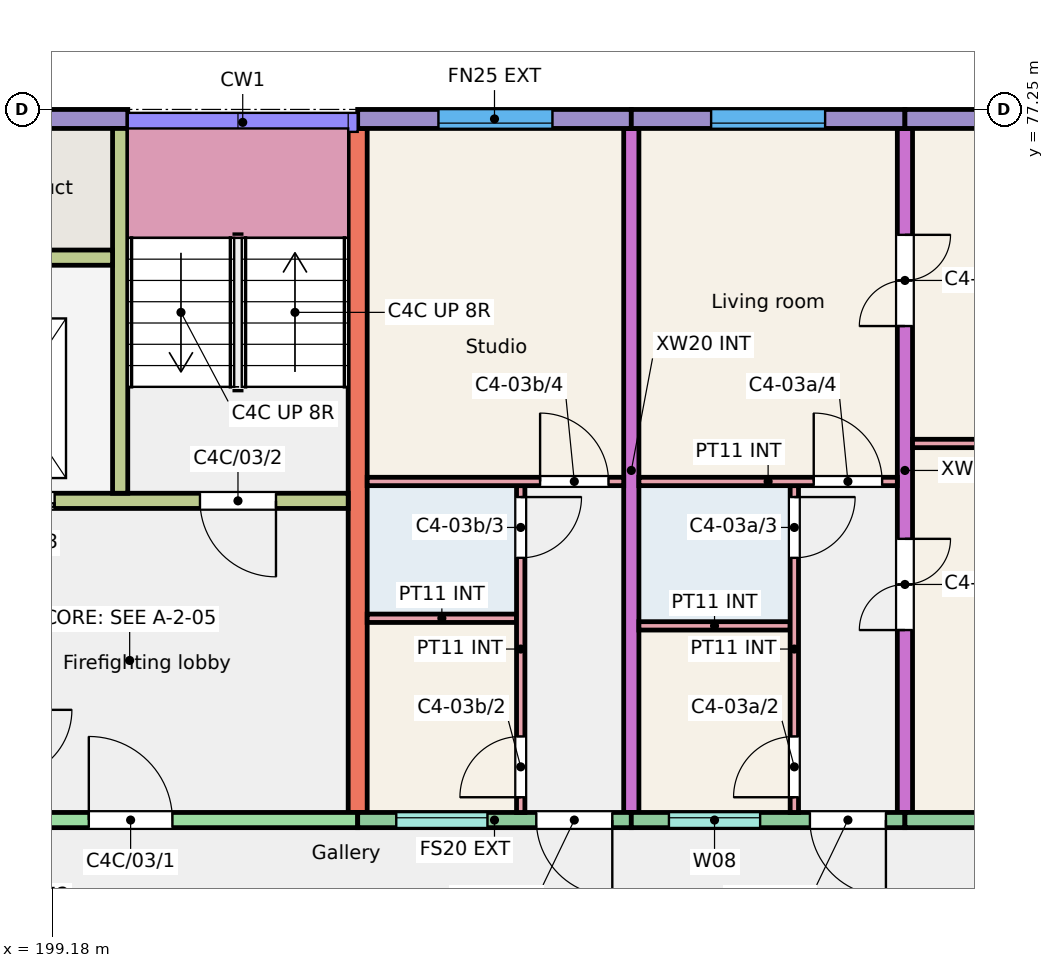
"""IFC4 building model, lengths in metres.
Left out: names, types, materials, properties, quantities, classifications, styles, units other than length and angle.
Written with IfcOpenShell. Run it as: python <this file> out.ifc"""

import sys

from ifc_helpers import new_model, si_unit, direction, frame, frame_2d, origin, place, context, subcontext, project, spatial, rectangle, extrude, element, fill, save


model = new_model("IFC4")
c1 = context("Model", 3, precision=1e-05, world=origin(), true_north=direction((0.0, 1.0)))
c2 = subcontext(c1, "Body", "Model", "MODEL_VIEW")
j1 = project(units=[si_unit("LENGTHUNIT", "METRE"), si_unit("PLANEANGLEUNIT", "RADIAN")], contexts=[c1])
p1 = place(None, origin())
s1 = spatial("IfcSite", under=j1, at=p1, CompositionType="ELEMENT")
p2 = place(p1, origin())
s2 = spatial("IfcBuilding", under=s1, at=p2, CompositionType="ELEMENT")
p3 = place(p2, frame((0.0, 0.0, 9.0)))
s3 = spatial("IfcBuildingStorey", under=s2, at=p3, CompositionType="ELEMENT", Elevation=9.0)
p4 = place(p3, frame((203.2, 68.0, 0.0), z_axis=(0.0, 0.0, 1.0), x_axis=(0.0, 1.0, 0.0)))
e1 = element("IfcWall", 1, at=p4, inside=s3, PredefinedType="SHEAR", context=c2, shape_type="SweptSolid", body=[
    extrude(rectangle(XDim=9.0, YDim=0.25, at=frame_2d((4.5, 0.0))), origin(), (0.0, 0.0, 1.0), 3.0),
])
p5 = place(p3, frame((206.8, 68.0, 0.0), z_axis=(0.0, 0.0, 1.0), x_axis=(0.0, 1.0, 0.0)))
e2 = element("IfcWall", 2, at=p5, inside=s3, PredefinedType="SHEAR", context=c2, shape_type="SweptSolid", body=[
    extrude(rectangle(XDim=9.0, YDim=0.2, at=frame_2d((4.5, 0.0))), origin(), (0.0, 0.0, 1.0), 3.0),
])
p6 = place(p3, frame((210.4, 68.0, 0.0), z_axis=(0.0, 0.0, 1.0), x_axis=(0.0, 1.0, 0.0)))
e3 = element("IfcWall", 3, at=p6, inside=s3, PredefinedType="SHEAR", context=c2, shape_type="SweptSolid", body=[
    extrude(rectangle(XDim=9.0, YDim=0.2, at=frame_2d((4.5, 0.0))), origin(), (0.0, 0.0, 1.0), 3.0),
])
p7 = place(p6, frame((2.4, 0.0, 0.0)))
e4 = element("IfcOpeningElement", 4, at=p7, cuts=e3, PredefinedType="OPENING", context=c2, shape_type="SweptSolid", body=[
    extrude(rectangle(XDim=1.2, YDim=2.1, at=frame_2d((0.6, 1.05))), frame((0.0, 0.11, 0.0), z_axis=(0.0, -1.0, 0.0), x_axis=(1.0, 0.0, 0.0)), (0.0, 0.0, 1.0), 0.22),
])
p8 = place(p6, frame((6.4, 0.0, 0.0)))
e5 = element("IfcOpeningElement", 5, at=p8, cuts=e3, PredefinedType="OPENING", context=c2, shape_type="SweptSolid", body=[
    extrude(rectangle(XDim=1.2, YDim=2.1, at=frame_2d((0.6, 1.05))), frame((0.0, 0.11, 0.0), z_axis=(0.0, -1.0, 0.0), x_axis=(1.0, 0.0, 0.0)), (0.0, 0.0, 1.0), 0.22),
])
p9 = place(p3, frame((197.2, 77.125, 0.0), z_axis=(0.0, 0.0, 1.0), x_axis=(1.0, 0.0, 0.0)))
e6 = element("IfcWall", 6, at=p9, inside=s3, PredefinedType="SOLIDWALL", context=c2, shape_type="SweptSolid", body=[
    extrude(rectangle(XDim=2.975, YDim=0.25, at=frame_2d((1.488, 0.0))), origin(), (0.0, 0.0, 1.0), 3.0),
])
p10 = place(p3, frame((197.35, 67.9, 0.0), z_axis=(0.0, 0.0, 1.0), x_axis=(1.0, 0.0, 0.0)))
e7 = element("IfcWall", 7, at=p10, inside=s3, PredefinedType="SHEAR", context=c2, shape_type="SweptSolid", body=[
    extrude(rectangle(XDim=5.85, YDim=0.2, at=frame_2d((2.925, 0.0))), origin(), (0.0, 0.0, 1.0), 3.0),
])
p11 = place(p10, frame((2.312, 0.0, 0.0)))
e8 = element("IfcOpeningElement", 8, at=p11, cuts=e7, PredefinedType="OPENING", context=c2, shape_type="SweptSolid", body=[
    extrude(rectangle(XDim=1.1, YDim=2.1, at=frame_2d((0.55, 1.05))), frame((0.0, 0.11, 0.0), z_axis=(0.0, -1.0, 0.0), x_axis=(1.0, 0.0, 0.0)), (0.0, 0.0, 1.0), 0.22),
])
p12 = place(p3, frame((197.35, 72.1, 0.0), z_axis=(0.0, 0.0, 1.0), x_axis=(1.0, 0.0, 0.0)))
e9 = element("IfcWall", 9, at=p12, inside=s3, PredefinedType="SHEAR", context=c2, shape_type="SweptSolid", body=[
    extrude(rectangle(XDim=5.725, YDim=0.2, at=frame_2d((2.862, 0.0))), origin(), (0.0, 0.0, 1.0), 3.0),
])
p13 = place(p12, frame((3.775, 0.0, 0.0)))
e10 = element("IfcOpeningElement", 10, at=p13, cuts=e9, PredefinedType="OPENING", context=c2, shape_type="SweptSolid", body=[
    extrude(rectangle(XDim=1.0, YDim=2.1, at=frame_2d((0.5, 1.05))), frame((0.0, 0.11, 0.0), z_axis=(0.0, -1.0, 0.0), x_axis=(1.0, 0.0, 0.0)), (0.0, 0.0, 1.0), 0.22),
])
p14 = place(p12, frame((0.762, 0.0, 0.0)))
e11 = element("IfcOpeningElement", 11, at=p14, cuts=e9, PredefinedType="OPENING", context=c2, shape_type="SweptSolid", body=[
    extrude(rectangle(XDim=1.1, YDim=2.1, at=frame_2d((0.55, 1.05))), frame((0.0, 0.11, 0.0), z_axis=(0.0, -1.0, 0.0), x_axis=(1.0, 0.0, 0.0)), (0.0, 0.0, 1.0), 0.22),
])
p15 = place(p3, frame((200.075, 72.2, 0.0), z_axis=(0.0, 0.0, 1.0), x_axis=(0.0, 1.0, 0.0)))
e12 = element("IfcWall", 12, at=p15, inside=s3, PredefinedType="SHEAR", context=c2, shape_type="SweptSolid", body=[
    extrude(rectangle(XDim=4.8, YDim=0.2, at=frame_2d((2.4, 0.0))), origin(), (0.0, 0.0, 1.0), 3.0),
])
p16 = place(p3, frame((197.35, 75.3, 0.0), z_axis=(0.0, 0.0, 1.0), x_axis=(1.0, 0.0, 0.0)))
e13 = element("IfcWall", 13, at=p16, inside=s3, PredefinedType="SHEAR", context=c2, shape_type="SweptSolid", body=[
    extrude(rectangle(XDim=2.625, YDim=0.2, at=frame_2d((1.312, 0.0))), origin(), (0.0, 0.0, 1.0), 3.0),
])
p17 = place(p3, frame((203.2, 77.125, 0.0), z_axis=(0.0, 0.0, 1.0), x_axis=(1.0, 0.0, 0.0)))
e14 = element("IfcWall", 14, at=p17, inside=s3, PredefinedType="SOLIDWALL", context=c2, shape_type="SweptSolid", body=[
    extrude(rectangle(XDim=3.6, YDim=0.25, at=frame_2d((1.8, 0.0))), origin(), (0.0, 0.0, 1.0), 3.0),
])
p18 = place(p17, frame((1.062, 0.0, 0.9)))
e15 = element("IfcOpeningElement", 15, at=p18, cuts=e14, PredefinedType="OPENING", context=c2, shape_type="SweptSolid", body=[
    extrude(rectangle(XDim=1.5, YDim=1.5, at=frame_2d((0.75, 0.75))), frame((0.0, 0.135, 0.0), z_axis=(0.0, -1.0, 0.0), x_axis=(1.0, 0.0, 0.0)), (0.0, 0.0, 1.0), 0.27),
])
p19 = place(p3, frame((203.2, 67.9, 0.0), z_axis=(0.0, 0.0, 1.0), x_axis=(1.0, 0.0, 0.0)))
e16 = element("IfcWall", 16, at=p19, inside=s3, PredefinedType="SOLIDWALL", context=c2, shape_type="SweptSolid", body=[
    extrude(rectangle(XDim=3.6, YDim=0.2, at=frame_2d((1.8, 0.0))), origin(), (0.0, 0.0, 1.0), 3.0),
])
p20 = place(p19, frame((0.508, 0.0, 1.1)))
e17 = element("IfcOpeningElement", 17, at=p20, cuts=e16, PredefinedType="OPENING", context=c2, shape_type="SweptSolid", body=[
    extrude(rectangle(XDim=1.2, YDim=1.3, at=frame_2d((0.6, 0.65))), frame((0.0, 0.11, 0.0), z_axis=(0.0, -1.0, 0.0), x_axis=(1.0, 0.0, 0.0)), (0.0, 0.0, 1.0), 0.22),
])
p21 = place(p19, frame((2.35, 0.0, 0.0)))
e18 = element("IfcOpeningElement", 18, at=p21, cuts=e16, PredefinedType="OPENING", context=c2, shape_type="SweptSolid", body=[
    extrude(rectangle(XDim=1.0, YDim=2.1, at=frame_2d((0.5, 1.05))), frame((0.0, 0.11, 0.0), z_axis=(0.0, -1.0, 0.0), x_axis=(1.0, 0.0, 0.0)), (0.0, 0.0, 1.0), 0.22),
])
p22 = place(p3, frame((206.8, 77.125, 0.0), z_axis=(0.0, 0.0, 1.0), x_axis=(1.0, 0.0, 0.0)))
e19 = element("IfcWall", 19, at=p22, inside=s3, PredefinedType="SOLIDWALL", context=c2, shape_type="SweptSolid", body=[
    extrude(rectangle(XDim=3.6, YDim=0.25, at=frame_2d((1.8, 0.0))), origin(), (0.0, 0.0, 1.0), 3.0),
])
p23 = place(p22, frame((1.05, 0.0, 0.9)))
e20 = element("IfcOpeningElement", 20, at=p23, cuts=e19, PredefinedType="OPENING", context=c2, shape_type="SweptSolid", body=[
    extrude(rectangle(XDim=1.5, YDim=1.5, at=frame_2d((0.75, 0.75))), frame((0.0, 0.135, 0.0), z_axis=(0.0, -1.0, 0.0), x_axis=(1.0, 0.0, 0.0)), (0.0, 0.0, 1.0), 0.27),
])
p24 = place(p3, frame((206.8, 67.9, 0.0), z_axis=(0.0, 0.0, 1.0), x_axis=(1.0, 0.0, 0.0)))
e21 = element("IfcWall", 21, at=p24, inside=s3, PredefinedType="SOLIDWALL", context=c2, shape_type="SweptSolid", body=[
    extrude(rectangle(XDim=3.6, YDim=0.2, at=frame_2d((1.8, 0.0))), origin(), (0.0, 0.0, 1.0), 3.0),
])
p25 = place(p24, frame((0.495, 0.0, 1.1)))
e22 = element("IfcOpeningElement", 22, at=p25, cuts=e21, PredefinedType="OPENING", context=c2, shape_type="SweptSolid", body=[
    extrude(rectangle(XDim=1.2, YDim=1.3, at=frame_2d((0.6, 0.65))), frame((0.0, 0.11, 0.0), z_axis=(0.0, -1.0, 0.0), x_axis=(1.0, 0.0, 0.0)), (0.0, 0.0, 1.0), 0.22),
])
p26 = place(p24, frame((2.35, 0.0, 0.0)))
e23 = element("IfcOpeningElement", 23, at=p26, cuts=e21, PredefinedType="OPENING", context=c2, shape_type="SweptSolid", body=[
    extrude(rectangle(XDim=1.0, YDim=2.1, at=frame_2d((0.5, 1.05))), frame((0.0, 0.11, 0.0), z_axis=(0.0, -1.0, 0.0), x_axis=(1.0, 0.0, 0.0)), (0.0, 0.0, 1.0), 0.22),
])
p27 = place(p3, frame((210.4, 77.125, 0.0), z_axis=(0.0, 0.0, 1.0), x_axis=(1.0, 0.0, 0.0)))
e24 = element("IfcWall", 24, at=p27, inside=s3, PredefinedType="SOLIDWALL", context=c2, shape_type="SweptSolid", body=[
    extrude(rectangle(XDim=3.6, YDim=0.25, at=frame_2d((1.8, 0.0))), origin(), (0.0, 0.0, 1.0), 3.0),
])
p28 = place(p27, frame((1.025, 0.0, 0.9)))
e25 = element("IfcOpeningElement", 25, at=p28, cuts=e24, PredefinedType="OPENING", context=c2, shape_type="SweptSolid", body=[
    extrude(rectangle(XDim=1.5, YDim=1.5, at=frame_2d((0.75, 0.75))), frame((0.0, 0.135, 0.0), z_axis=(0.0, -1.0, 0.0), x_axis=(1.0, 0.0, 0.0)), (0.0, 0.0, 1.0), 0.27),
])
p29 = place(p3, frame((210.4, 67.9, 0.0), z_axis=(0.0, 0.0, 1.0), x_axis=(1.0, 0.0, 0.0)))
e26 = element("IfcWall", 26, at=p29, inside=s3, PredefinedType="SOLIDWALL", context=c2, shape_type="SweptSolid", body=[
    extrude(rectangle(XDim=3.45, YDim=0.2, at=frame_2d((1.725, 0.0))), origin(), (0.0, 0.0, 1.0), 3.0),
])
p30 = place(p29, frame((1.025, 0.0, 0.9)))
e27 = element("IfcOpeningElement", 27, at=p30, cuts=e26, PredefinedType="OPENING", context=c2, shape_type="SweptSolid", body=[
    extrude(rectangle(XDim=1.5, YDim=1.5, at=frame_2d((0.75, 0.75))), frame((0.0, 0.11, 0.0), z_axis=(0.0, -1.0, 0.0), x_axis=(1.0, 0.0, 0.0)), (0.0, 0.0, 1.0), 0.22),
])
p31 = place(p3, frame((206.9, 70.455, 0.0), z_axis=(0.0, 0.0, 1.0), x_axis=(1.0, 0.0, 0.0)))
e28 = element("IfcWall", 28, at=p31, inside=s3, PredefinedType="PARTITIONING", context=c2, shape_type="SweptSolid", body=[
    extrude(rectangle(XDim=1.99, YDim=0.11, at=frame_2d((0.995, 0.0))), origin(), (0.0, 0.0, 1.0), 2.8),
])
p32 = place(p3, frame((208.945, 68.0, 0.0), z_axis=(0.0, 0.0, 1.0), x_axis=(0.0, 1.0, 0.0)))
e29 = element("IfcWall", 29, at=p32, inside=s3, PredefinedType="PARTITIONING", context=c2, shape_type="SweptSolid", body=[
    extrude(rectangle(XDim=4.3, YDim=0.11, at=frame_2d((2.15, 0.0))), origin(), (0.0, 0.0, 1.0), 2.8),
])
p33 = place(p32, frame((0.2, 0.0, 0.0)))
e30 = element("IfcOpeningElement", 30, at=p33, cuts=e29, PredefinedType="OPENING", context=c2, shape_type="SweptSolid", body=[
    extrude(rectangle(XDim=0.8, YDim=2.1, at=frame_2d((0.4, 1.05))), frame((0.0, 0.065, 0.0), z_axis=(0.0, -1.0, 0.0), x_axis=(1.0, 0.0, 0.0)), (0.0, 0.0, 1.0), 0.13),
])
p34 = place(p32, frame((3.35, 0.0, 0.0)))
e31 = element("IfcOpeningElement", 31, at=p34, cuts=e29, PredefinedType="OPENING", context=c2, shape_type="SweptSolid", body=[
    extrude(rectangle(XDim=0.8, YDim=2.1, at=frame_2d((0.4, 1.05))), frame((0.0, 0.065, 0.0), z_axis=(0.0, -1.0, 0.0), x_axis=(1.0, 0.0, 0.0)), (0.0, 0.0, 1.0), 0.13),
])
p35 = place(p3, frame((206.9, 72.355, 0.0), z_axis=(0.0, 0.0, 1.0), x_axis=(1.0, 0.0, 0.0)))
e32 = element("IfcWall", 32, at=p35, inside=s3, PredefinedType="PARTITIONING", context=c2, shape_type="SweptSolid", body=[
    extrude(rectangle(XDim=3.4, YDim=0.11, at=frame_2d((1.7, 0.0))), origin(), (0.0, 0.0, 1.0), 2.8),
])
p36 = place(p35, frame((2.3, 0.0, 0.0)))
e33 = element("IfcOpeningElement", 33, at=p36, cuts=e32, PredefinedType="OPENING", context=c2, shape_type="SweptSolid", body=[
    extrude(rectangle(XDim=0.9, YDim=2.1, at=frame_2d((0.45, 1.05))), frame((0.0, 0.065, 0.0), z_axis=(0.0, -1.0, 0.0), x_axis=(1.0, 0.0, 0.0)), (0.0, 0.0, 1.0), 0.13),
])
p37 = place(p3, frame((210.5, 72.855, 0.0), z_axis=(0.0, 0.0, 1.0), x_axis=(1.0, 0.0, 0.0)))
e34 = element("IfcWall", 34, at=p37, inside=s3, PredefinedType="PARTITIONING", context=c2, shape_type="SweptSolid", body=[
    extrude(rectangle(XDim=3.35, YDim=0.11, at=frame_2d((1.675, 0.0))), origin(), (0.0, 0.0, 1.0), 2.8),
])
p38 = place(p3, frame((203.325, 70.555, 0.0), z_axis=(0.0, 0.0, 1.0), x_axis=(1.0, 0.0, 0.0)))
e35 = element("IfcWall", 35, at=p38, inside=s3, PredefinedType="PARTITIONING", context=c2, shape_type="SweptSolid", body=[
    extrude(rectangle(XDim=1.965, YDim=0.11, at=frame_2d((0.982, 0.0))), origin(), (0.0, 0.0, 1.0), 2.8),
])
p39 = place(p3, frame((205.345, 68.0, 0.0), z_axis=(0.0, 0.0, 1.0), x_axis=(0.0, 1.0, 0.0)))
e36 = element("IfcWall", 36, at=p39, inside=s3, PredefinedType="PARTITIONING", context=c2, shape_type="SweptSolid", body=[
    extrude(rectangle(XDim=4.3, YDim=0.11, at=frame_2d((2.15, 0.0))), origin(), (0.0, 0.0, 1.0), 2.8),
])
p40 = place(p39, frame((0.2, 0.0, 0.0)))
e37 = element("IfcOpeningElement", 37, at=p40, cuts=e36, PredefinedType="OPENING", context=c2, shape_type="SweptSolid", body=[
    extrude(rectangle(XDim=0.8, YDim=2.1, at=frame_2d((0.4, 1.05))), frame((0.0, 0.065, 0.0), z_axis=(0.0, -1.0, 0.0), x_axis=(1.0, 0.0, 0.0)), (0.0, 0.0, 1.0), 0.13),
])
p41 = place(p39, frame((3.35, 0.0, 0.0)))
e38 = element("IfcOpeningElement", 38, at=p41, cuts=e36, PredefinedType="OPENING", context=c2, shape_type="SweptSolid", body=[
    extrude(rectangle(XDim=0.8, YDim=2.1, at=frame_2d((0.4, 1.05))), frame((0.0, 0.065, 0.0), z_axis=(0.0, -1.0, 0.0), x_axis=(1.0, 0.0, 0.0)), (0.0, 0.0, 1.0), 0.13),
])
p42 = place(p3, frame((203.325, 72.355, 0.0), z_axis=(0.0, 0.0, 1.0), x_axis=(1.0, 0.0, 0.0)))
e39 = element("IfcWall", 39, at=p42, inside=s3, PredefinedType="PARTITIONING", context=c2, shape_type="SweptSolid", body=[
    extrude(rectangle(XDim=3.375, YDim=0.11, at=frame_2d((1.688, 0.0))), origin(), (0.0, 0.0, 1.0), 2.8),
])
p43 = place(p42, frame((2.275, 0.0, 0.0)))
e40 = element("IfcOpeningElement", 40, at=p43, cuts=e39, PredefinedType="OPENING", context=c2, shape_type="SweptSolid", body=[
    extrude(rectangle(XDim=0.9, YDim=2.1, at=frame_2d((0.45, 1.05))), frame((0.0, 0.065, 0.0), z_axis=(0.0, -1.0, 0.0), x_axis=(1.0, 0.0, 0.0)), (0.0, 0.0, 1.0), 0.13),
])
p44 = place(p25, origin())
e41 = element("IfcWindow", 41, at=p44, inside=s3, PartitioningType="SINGLE_PANEL", PredefinedType="WINDOW", context=c2, shape_type="SweptSolid", body=[
    extrude(rectangle(XDim=1.2, YDim=1.3, at=frame_2d((0.6, 0.65))), frame((0.0, 0.06, 0.0), z_axis=(0.0, -1.0, 0.0), x_axis=(1.0, 0.0, 0.0)), (0.0, 0.0, 1.0), 0.06),
])
fill(e22, e41)
p45 = place(p23, origin())
e42 = element("IfcWindow", 42, at=p45, inside=s3, PartitioningType="SINGLE_PANEL", PredefinedType="WINDOW", context=c2, shape_type="SweptSolid", body=[
    extrude(rectangle(XDim=1.5, YDim=1.5, at=frame_2d((0.75, 0.75))), frame((0.0, -0.025, 0.0), z_axis=(0.0, -1.0, 0.0), x_axis=(1.0, 0.0, 0.0)), (0.0, 0.0, 1.0), 0.06),
])
fill(e20, e42)
p46 = place(p20, origin())
e43 = element("IfcWindow", 43, at=p46, inside=s3, PartitioningType="SINGLE_PANEL", PredefinedType="WINDOW", context=c2, shape_type="SweptSolid", body=[
    extrude(rectangle(XDim=1.2, YDim=1.3, at=frame_2d((0.6, 0.65))), frame((0.0, 0.06, 0.0), z_axis=(0.0, -1.0, 0.0), x_axis=(1.0, 0.0, 0.0)), (0.0, 0.0, 1.0), 0.06),
])
fill(e17, e43)
p47 = place(p18, origin())
e44 = element("IfcWindow", 44, at=p47, inside=s3, PartitioningType="SINGLE_PANEL", PredefinedType="WINDOW", context=c2, shape_type="SweptSolid", body=[
    extrude(rectangle(XDim=1.5, YDim=1.5, at=frame_2d((0.75, 0.75))), frame((0.0, -0.025, 0.0), z_axis=(0.0, -1.0, 0.0), x_axis=(1.0, 0.0, 0.0)), (0.0, 0.0, 1.0), 0.06),
])
fill(e15, e44)
p48 = place(p26, origin())
e45 = element("IfcDoor", 45, at=p48, inside=s3, OperationType="SINGLE_SWING_RIGHT", PredefinedType="DOOR", context=c2, shape_type="SweptSolid", body=[
    extrude(rectangle(XDim=1.0, YDim=2.1, at=frame_2d((0.5, 1.05))), frame((0.0, 0.025, 0.0), z_axis=(0.0, -1.0, 0.0), x_axis=(1.0, 0.0, 0.0)), (0.0, 0.0, 1.0), 0.05),
])
fill(e23, e45)
p49 = place(p33, origin())
e46 = element("IfcDoor", 46, at=p49, inside=s3, OperationType="SINGLE_SWING_LEFT", PredefinedType="DOOR", context=c2, shape_type="SweptSolid", body=[
    extrude(rectangle(XDim=0.8, YDim=2.1, at=frame_2d((0.4, 1.05))), frame((0.0, 0.025, 0.0), z_axis=(0.0, -1.0, 0.0), x_axis=(1.0, 0.0, 0.0)), (0.0, 0.0, 1.0), 0.05),
])
fill(e30, e46)
p50 = place(p34, origin())
e47 = element("IfcDoor", 47, at=p50, inside=s3, OperationType="SINGLE_SWING_RIGHT", PredefinedType="DOOR", context=c2, shape_type="SweptSolid", body=[
    extrude(rectangle(XDim=0.8, YDim=2.1, at=frame_2d((0.4, 1.05))), frame((0.0, 0.025, 0.0), z_axis=(0.0, -1.0, 0.0), x_axis=(1.0, 0.0, 0.0)), (0.0, 0.0, 1.0), 0.05),
])
fill(e31, e47)
p51 = place(p36, origin())
e48 = element("IfcDoor", 48, at=p51, inside=s3, OperationType="SINGLE_SWING_LEFT", PredefinedType="DOOR", context=c2, shape_type="SweptSolid", body=[
    extrude(rectangle(XDim=0.9, YDim=2.1, at=frame_2d((0.45, 1.05))), frame((0.0, 0.025, 0.0), z_axis=(0.0, -1.0, 0.0), x_axis=(1.0, 0.0, 0.0)), (0.0, 0.0, 1.0), 0.05),
])
fill(e33, e48)
p52 = place(p7, origin())
e49 = element("IfcDoor", 49, at=p52, inside=s3, OperationType="DOUBLE_DOOR_SINGLE_SWING", PredefinedType="DOOR", context=c2, shape_type="SweptSolid", body=[
    extrude(rectangle(XDim=1.2, YDim=2.1, at=frame_2d((0.6, 1.05))), frame((0.0, 0.025, 0.0), z_axis=(0.0, -1.0, 0.0), x_axis=(1.0, 0.0, 0.0)), (0.0, 0.0, 1.0), 0.05),
])
fill(e4, e49)
p53 = place(p8, origin())
e50 = element("IfcDoor", 50, at=p53, inside=s3, OperationType="DOUBLE_DOOR_SINGLE_SWING", PredefinedType="DOOR", context=c2, shape_type="SweptSolid", body=[
    extrude(rectangle(XDim=1.2, YDim=2.1, at=frame_2d((0.6, 1.05))), frame((0.0, 0.025, 0.0), z_axis=(0.0, -1.0, 0.0), x_axis=(1.0, 0.0, 0.0)), (0.0, 0.0, 1.0), 0.05),
])
fill(e5, e50)
p54 = place(p21, origin())
e51 = element("IfcDoor", 51, at=p54, inside=s3, OperationType="SINGLE_SWING_RIGHT", PredefinedType="DOOR", context=c2, shape_type="SweptSolid", body=[
    extrude(rectangle(XDim=1.0, YDim=2.1, at=frame_2d((0.5, 1.05))), frame((0.0, 0.025, 0.0), z_axis=(0.0, -1.0, 0.0), x_axis=(1.0, 0.0, 0.0)), (0.0, 0.0, 1.0), 0.05),
])
fill(e18, e51)
p55 = place(p40, origin())
e52 = element("IfcDoor", 52, at=p55, inside=s3, OperationType="SINGLE_SWING_LEFT", PredefinedType="DOOR", context=c2, shape_type="SweptSolid", body=[
    extrude(rectangle(XDim=0.8, YDim=2.1, at=frame_2d((0.4, 1.05))), frame((0.0, 0.025, 0.0), z_axis=(0.0, -1.0, 0.0), x_axis=(1.0, 0.0, 0.0)), (0.0, 0.0, 1.0), 0.05),
])
fill(e37, e52)
p56 = place(p41, origin())
e53 = element("IfcDoor", 53, at=p56, inside=s3, OperationType="SINGLE_SWING_RIGHT", PredefinedType="DOOR", context=c2, shape_type="SweptSolid", body=[
    extrude(rectangle(XDim=0.8, YDim=2.1, at=frame_2d((0.4, 1.05))), frame((0.0, 0.025, 0.0), z_axis=(0.0, -1.0, 0.0), x_axis=(1.0, 0.0, 0.0)), (0.0, 0.0, 1.0), 0.05),
])
fill(e38, e53)
p57 = place(p43, origin())
e54 = element("IfcDoor", 54, at=p57, inside=s3, OperationType="SINGLE_SWING_LEFT", PredefinedType="DOOR", context=c2, shape_type="SweptSolid", body=[
    extrude(rectangle(XDim=0.9, YDim=2.1, at=frame_2d((0.45, 1.05))), frame((0.0, 0.025, 0.0), z_axis=(0.0, -1.0, 0.0), x_axis=(1.0, 0.0, 0.0)), (0.0, 0.0, 1.0), 0.05),
])
fill(e40, e54)
p58 = place(p11, origin())
e55 = element("IfcDoor", 55, at=p58, inside=s3, OperationType="SINGLE_SWING_LEFT", PredefinedType="DOOR", context=c2, shape_type="SweptSolid", body=[
    extrude(rectangle(XDim=1.1, YDim=2.1, at=frame_2d((0.55, 1.05))), frame((0.0, 0.025, 0.0), z_axis=(0.0, -1.0, 0.0), x_axis=(1.0, 0.0, 0.0)), (0.0, 0.0, 1.0), 0.05),
])
fill(e8, e55)
p59 = place(p13, origin())
e56 = element("IfcDoor", 56, at=p59, inside=s3, OperationType="SINGLE_SWING_RIGHT", PredefinedType="DOOR", context=c2, shape_type="SweptSolid", body=[
    extrude(rectangle(XDim=1.0, YDim=2.1, at=frame_2d((0.5, 1.05))), frame((0.0, 0.025, 0.0), z_axis=(0.0, -1.0, 0.0), x_axis=(1.0, 0.0, 0.0)), (0.0, 0.0, 1.0), 0.05),
])
fill(e10, e56)
p60 = place(p14, origin())
e57 = element("IfcDoor", 57, at=p60, inside=s3, OperationType="DOUBLE_DOOR_SLIDING", PredefinedType="DOOR", context=c2, shape_type="SweptSolid", body=[
    extrude(rectangle(XDim=1.1, YDim=2.1, at=frame_2d((0.55, 1.05))), frame((0.0, 0.025, 0.0), z_axis=(0.0, -1.0, 0.0), x_axis=(1.0, 0.0, 0.0)), (0.0, 0.0, 1.0), 0.05),
])
fill(e11, e57)
save(model, sys.argv[1])
